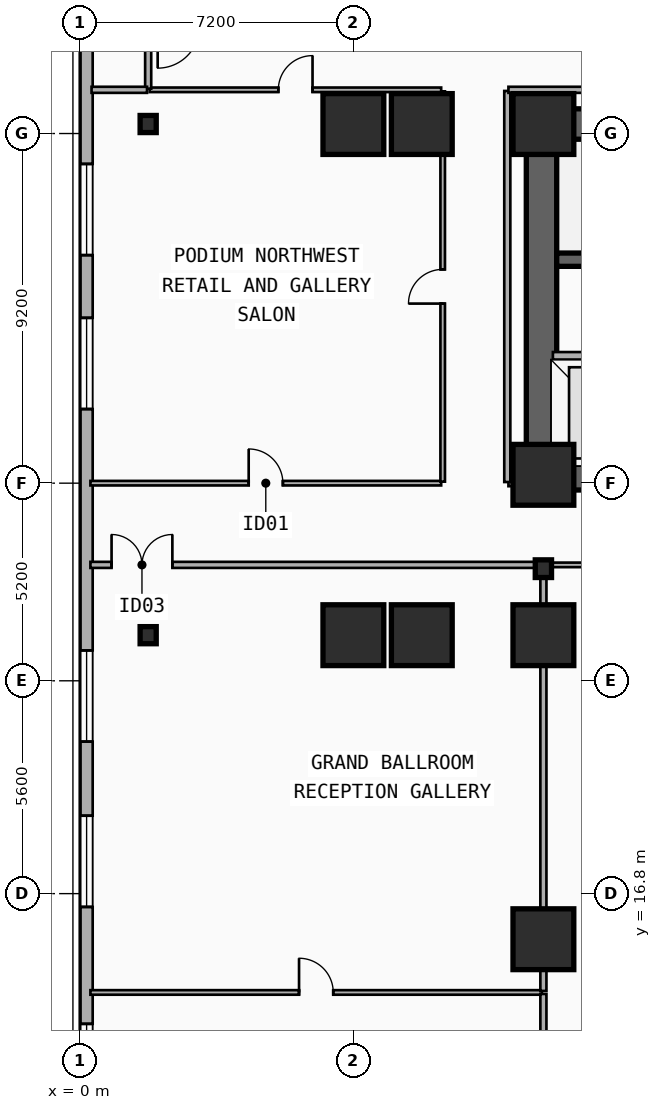
"""IFC4 building model, lengths in metres.
Left out: names, types, materials, properties, quantities, classifications, styles, units other than length and angle.
Written with IfcOpenShell. Run it as: python <this file> out.ifc"""

import sys

from ifc_helpers import new_model, si_unit, direction, frame, frame_2d, origin, origin_2d, place, context, subcontext, project, spatial, rectangle, i_section, extrude, element, fill, save


model = new_model("IFC4")
c1 = context("Model", 3, precision=1e-05, world=origin(), true_north=direction((0.0, 1.0)))
c2 = subcontext(c1, "Body", "Model", "MODEL_VIEW")
j1 = project(units=[si_unit("LENGTHUNIT", "METRE"), si_unit("PLANEANGLEUNIT", "RADIAN")], contexts=[c1])
p1 = place(None, origin())
s1 = spatial("IfcSite", under=j1, at=p1, CompositionType="ELEMENT")
p2 = place(p1, origin())
s2 = spatial("IfcBuilding", under=s1, at=p2, CompositionType="ELEMENT")
p3 = place(p2, frame((0.0, 0.0, 19.4)))
s3 = spatial("IfcBuildingStorey", under=s2, at=p3, CompositionType="ELEMENT", Elevation=19.4)
p4 = place(p3, frame((12.15, 37.05, 0.0), z_axis=(0.0, 0.0, 1.0), x_axis=(1.0, 0.0, 0.0)))
e1 = element("IfcWall", 1, at=p4, inside=s3, PredefinedType="SHEAR", context=c2, shape_type="SweptSolid", body=[
    extrude(rectangle(XDim=33.23, YDim=0.8, at=frame_2d((16.615, 0.0))), origin(), (0.0, 0.0, 1.0), 4.8),
])
p5 = place(p3, frame((21.18, 27.82, 0.0), z_axis=(0.0, 0.0, 1.0), x_axis=(-1.0, 0.0, 0.0)))
e2 = element("IfcWall", 2, at=p5, inside=s3, PredefinedType="SHEAR", context=c2, shape_type="SweptSolid", body=[
    extrude(rectangle(XDim=9.03, YDim=0.8, at=frame_2d((4.515, 0.0))), origin(), (0.0, 0.0, 1.0), 4.8),
])
p6 = place(p5, frame((2.68, 0.0, 0.0)))
e3 = element("IfcOpeningElement", 3, at=p6, cuts=e2, PredefinedType="OPENING", context=c2, shape_type="SweptSolid", body=[
    extrude(rectangle(XDim=1.1, YDim=2.15, at=frame_2d((0.55, 1.075))), frame((0.0, 0.41, 0.0), z_axis=(0.0, -1.0, 0.0), x_axis=(1.0, 0.0, 0.0)), (0.0, 0.0, 1.0), 0.82),
])
p7 = place(p3, frame((12.15, 28.22, 0.0), z_axis=(0.0, 0.0, 1.0), x_axis=(0.0, 1.0, 0.0)))
e4 = element("IfcWall", 4, at=p7, inside=s3, PredefinedType="SHEAR", context=c2, shape_type="SweptSolid", body=[
    extrude(rectangle(XDim=8.43, YDim=0.8, at=frame_2d((4.215, 0.0))), origin(), (0.0, 0.0, 1.0), 4.8),
])
p8 = place(p3, frame((21.005, 33.48, 0.0), z_axis=(0.0, 0.0, 1.0), x_axis=(-1.0, 0.0, 0.0)))
e5 = element("IfcWall", 5, at=p8, inside=s3, PredefinedType="SHEAR", context=c2, shape_type="SweptSolid", body=[
    extrude(rectangle(XDim=8.455, YDim=0.35, at=frame_2d((4.228, 0.0))), origin(), (0.0, 0.0, 1.0), 4.8),
])
p9 = place(p8, frame((0.22, 0.0, 0.0)))
e6 = element("IfcOpeningElement", 6, at=p9, cuts=e5, PredefinedType="OPENING", context=c2, shape_type="SweptSolid", body=[
    extrude(rectangle(XDim=1.1, YDim=2.15, at=frame_2d((0.55, 1.075))), frame((0.0, 0.185, 0.0), z_axis=(0.0, -1.0, 0.0), x_axis=(1.0, 0.0, 0.0)), (0.0, 0.0, 1.0), 0.37),
])
for number, where, z_axis, x_axis in (
    (7, (12.2, 27.82, 0.0), (0.0, 0.0, 1.0), (1.0, 0.0, 0.0)),
    (8, (12.2, 37.05, 0.0), (0.0, 0.0, 1.0), (1.0, 0.0, 0.0)),
):
    element("IfcColumn", number, at=place(p3, frame(where, z_axis=z_axis, x_axis=x_axis)), inside=s3, PredefinedType="COLUMN", context=c2, shape_type="SweptSolid", body=[
        extrude(rectangle(XDim=1.6, YDim=1.6, at=origin_2d()), origin(), (0.0, 0.0, 1.0), 4.8),
    ])
p10 = place(p3, frame((12.2, 25.35, 0.0), z_axis=(0.0, 0.0, 1.0), x_axis=(1.0, 0.0, 0.0)))
e9 = element("IfcColumn", 9, at=p10, inside=s3, PredefinedType="COLUMN", context=c2, shape_type="SweptSolid", body=[
    extrude(i_section(OverallWidth=0.428, OverallDepth=0.465, WebThickness=0.045, FlangeThickness=0.073, FilletRadius=0.015, at=origin_2d()), origin(), (0.0, 0.0, 1.0), 4.8),
])
for number, where, z_axis, x_axis in (
    (10, (1.8, 23.6, 0.0), (0.0, 0.0, 1.0), (1.0, 0.0, 0.0)),
    (11, (1.8, 37.05, 0.0), (0.0, 0.0, 1.0), (1.0, 0.0, 0.0)),
):
    element("IfcColumn", number, at=place(p3, frame(where, z_axis=z_axis, x_axis=x_axis)), inside=s3, PredefinedType="COLUMN", context=c2, shape_type="SweptSolid", body=[
        extrude(i_section(OverallWidth=0.424, OverallDepth=0.45, WebThickness=0.041, FlangeThickness=0.065, FilletRadius=0.015, at=origin_2d()), origin(), (0.0, 0.0, 1.0), 4.8),
    ])
for number, where, z_axis, x_axis in (
    (12, (7.2, 23.6, 0.0), (0.0, 0.0, 1.0), (1.0, 0.0, 0.0)),
    (13, (7.2, 37.05, 0.0), (0.0, 0.0, 1.0), (1.0, 0.0, 0.0)),
    (14, (9.0, 23.6, 0.0), (0.0, 0.0, 1.0), (1.0, 0.0, 0.0)),
    (15, (9.0, 37.05, 0.0), (0.0, 0.0, 1.0), (1.0, 0.0, 0.0)),
    (16, (12.2, 15.6, 0.0), (0.0, 0.0, 1.0), (1.0, 0.0, 0.0)),
    (17, (12.2, 23.6, 0.0), (0.0, 0.0, 1.0), (1.0, 0.0, 0.0)),
):
    element("IfcColumn", number, at=place(p3, frame(where, z_axis=z_axis, x_axis=x_axis)), inside=s3, PredefinedType="COLUMN", context=c2, shape_type="SweptSolid", body=[
        extrude(rectangle(XDim=1.6, YDim=1.6, at=origin_2d()), origin(), (0.0, 0.0, 1.0), 4.8),
    ])
p11 = place(p3, frame((0.18, 7.2, 0.0), z_axis=(0.0, 0.0, 1.0), x_axis=(0.0, 1.0, 0.0)))
e18 = element("IfcWall", 18, at=p11, inside=s3, PredefinedType="SOLIDWALL", context=c2, shape_type="SweptSolid", body=[
    extrude(rectangle(XDim=34.4, YDim=0.32, at=frame_2d((17.2, 0.0))), origin(), (0.0, 0.0, 1.0), 4.5),
])
p12 = place(p11, frame((22.35, 0.0, 0.9)))
e19 = element("IfcOpeningElement", 19, at=p12, cuts=e18, PredefinedType="OPENING", context=c2, shape_type="SweptSolid", body=[
    extrude(rectangle(XDim=2.4, YDim=1.8, at=frame_2d((1.2, 0.9))), frame((0.0, 0.17, 0.0), z_axis=(0.0, -1.0, 0.0), x_axis=(1.0, 0.0, 0.0)), (0.0, 0.0, 1.0), 0.34),
])
p13 = place(p11, frame((26.4, 0.0, 0.9)))
e20 = element("IfcOpeningElement", 20, at=p13, cuts=e18, PredefinedType="OPENING", context=c2, shape_type="SweptSolid", body=[
    extrude(rectangle(XDim=2.4, YDim=1.8, at=frame_2d((1.2, 0.9))), frame((0.0, 0.17, 0.0), z_axis=(0.0, -1.0, 0.0), x_axis=(1.0, 0.0, 0.0)), (0.0, 0.0, 1.0), 0.34),
])
p14 = place(p11, frame((0.847, 0.0, 0.9)))
e21 = element("IfcOpeningElement", 21, at=p14, cuts=e18, PredefinedType="OPENING", context=c2, shape_type="SweptSolid", body=[
    extrude(rectangle(XDim=2.4, YDim=1.8, at=frame_2d((1.2, 0.9))), frame((0.0, 0.17, 0.0), z_axis=(0.0, -1.0, 0.0), x_axis=(1.0, 0.0, 0.0)), (0.0, 0.0, 1.0), 0.34),
])
p15 = place(p11, frame((3.773, 0.0, 0.9)))
e22 = element("IfcOpeningElement", 22, at=p15, cuts=e18, PredefinedType="OPENING", context=c2, shape_type="SweptSolid", body=[
    extrude(rectangle(XDim=2.4, YDim=1.8, at=frame_2d((1.2, 0.9))), frame((0.0, 0.17, 0.0), z_axis=(0.0, -1.0, 0.0), x_axis=(1.0, 0.0, 0.0)), (0.0, 0.0, 1.0), 0.34),
])
p16 = place(p11, frame((9.25, 0.0, 0.9)))
e23 = element("IfcOpeningElement", 23, at=p16, cuts=e18, PredefinedType="OPENING", context=c2, shape_type="SweptSolid", body=[
    extrude(rectangle(XDim=2.4, YDim=1.8, at=frame_2d((1.2, 0.9))), frame((0.0, 0.17, 0.0), z_axis=(0.0, -1.0, 0.0), x_axis=(1.0, 0.0, 0.0)), (0.0, 0.0, 1.0), 0.34),
])
p17 = place(p11, frame((13.6, 0.0, 0.9)))
e24 = element("IfcOpeningElement", 24, at=p17, cuts=e18, PredefinedType="OPENING", context=c2, shape_type="SweptSolid", body=[
    extrude(rectangle(XDim=2.4, YDim=1.8, at=frame_2d((1.2, 0.9))), frame((0.0, 0.17, 0.0), z_axis=(0.0, -1.0, 0.0), x_axis=(1.0, 0.0, 0.0)), (0.0, 0.0, 1.0), 0.34),
])
p18 = place(p3, frame((12.45, 30.95, 0.0), z_axis=(0.0, 0.0, 1.0), x_axis=(1.0, 0.0, 0.0)))
e25 = element("IfcWall", 25, at=p18, inside=s3, PredefinedType="PARTITIONING", context=c2, shape_type="SweptSolid", body=[
    extrude(rectangle(XDim=2.75, YDim=0.2, at=frame_2d((1.375, 0.0))), origin(), (0.0, 0.0, 1.0), 3.472),
])
p19 = place(p3, frame((0.28, 27.6, 0.0), z_axis=(0.0, 0.0, 1.0), x_axis=(1.0, 0.0, 0.0)))
e26 = element("IfcWall", 26, at=p19, inside=s3, PredefinedType="PARTITIONING", context=c2, shape_type="SweptSolid", body=[
    extrude(rectangle(XDim=9.23, YDim=0.12, at=frame_2d((4.615, 0.0))), origin(), (0.0, 0.0, 1.0), 4.5),
])
p20 = place(p19, frame((4.165, 0.0, 0.0)))
e27 = element("IfcOpeningElement", 27, at=p20, cuts=e26, PredefinedType="OPENING", context=c2, shape_type="SweptSolid", body=[
    extrude(rectangle(XDim=0.9, YDim=2.1, at=frame_2d((0.45, 1.05))), frame((0.0, 0.07, 0.0), z_axis=(0.0, -1.0, 0.0), x_axis=(1.0, 0.0, 0.0)), (0.0, 0.0, 1.0), 0.14),
])
p21 = place(p3, frame((0.28, 25.45, 0.0), z_axis=(0.0, 0.0, 1.0), x_axis=(1.0, 0.0, 0.0)))
e28 = element("IfcWall", 28, at=p21, inside=s3, PredefinedType="PARTITIONING", context=c2, shape_type="SweptSolid", body=[
    extrude(rectangle(XDim=11.88, YDim=0.16, at=frame_2d((5.94, 0.0))), origin(), (0.0, 0.0, 1.0), 3.666),
])
p22 = place(p21, frame((0.557, 0.0, 0.0)))
e29 = element("IfcOpeningElement", 29, at=p22, cuts=e28, PredefinedType="OPENING", context=c2, shape_type="SweptSolid", body=[
    extrude(rectangle(XDim=1.6, YDim=2.2, at=frame_2d((0.8, 1.1))), frame((0.0, 0.09, 0.0), z_axis=(0.0, -1.0, 0.0), x_axis=(1.0, 0.0, 0.0)), (0.0, 0.0, 1.0), 0.18),
])
p23 = place(p3, frame((12.24, 25.45, 0.0), z_axis=(0.0, 0.0, 1.0), x_axis=(1.0, 0.0, 0.0)))
e30 = element("IfcWall", 30, at=p23, inside=s3, PredefinedType="PARTITIONING", context=c2, shape_type="SweptSolid", body=[
    extrude(rectangle(XDim=6.52, YDim=0.12, at=frame_2d((3.26, 0.0))), origin(), (0.0, 0.0, 1.0), 3.666),
])
p24 = place(p23, frame((2.81, 0.0, 0.0)))
e31 = element("IfcOpeningElement", 31, at=p24, cuts=e30, PredefinedType="OPENING", context=c2, shape_type="SweptSolid", body=[
    extrude(rectangle(XDim=0.9, YDim=2.1, at=frame_2d((0.45, 1.05))), frame((0.0, 0.07, 0.0), z_axis=(0.0, -1.0, 0.0), x_axis=(1.0, 0.0, 0.0)), (0.0, 0.0, 1.0), 0.14),
])
p25 = place(p3, frame((9.55, 27.64, 0.0), z_axis=(0.0, 0.0, 1.0), x_axis=(0.0, 1.0, 0.0)))
e32 = element("IfcWall", 32, at=p25, inside=s3, PredefinedType="PARTITIONING", context=c2, shape_type="SweptSolid", body=[
    extrude(rectangle(XDim=10.27, YDim=0.12, at=frame_2d((5.135, 0.0))), origin(), (0.0, 0.0, 1.0), 4.5),
])
p26 = place(p25, frame((4.685, 0.0, 0.0)))
e33 = element("IfcOpeningElement", 33, at=p26, cuts=e32, PredefinedType="OPENING", context=c2, shape_type="SweptSolid", body=[
    extrude(rectangle(XDim=0.9, YDim=2.1, at=frame_2d((0.45, 1.05))), frame((0.0, 0.07, 0.0), z_axis=(0.0, -1.0, 0.0), x_axis=(1.0, 0.0, 0.0)), (0.0, 0.0, 1.0), 0.14),
])
p27 = place(p3, frame((1.84, 37.95, 0.0), z_axis=(0.0, 0.0, 1.0), x_axis=(1.0, 0.0, 0.0)))
e34 = element("IfcWall", 34, at=p27, inside=s3, PredefinedType="PARTITIONING", context=c2, shape_type="SweptSolid", body=[
    extrude(rectangle(XDim=7.67, YDim=0.12, at=frame_2d((3.835, 0.0))), origin(), (0.0, 0.0, 1.0), 4.5),
])
p28 = place(p27, frame((3.385, 0.0, 0.0)))
e35 = element("IfcOpeningElement", 35, at=p28, cuts=e34, PredefinedType="OPENING", context=c2, shape_type="SweptSolid", body=[
    extrude(rectangle(XDim=0.9, YDim=2.1, at=frame_2d((0.45, 1.05))), frame((0.0, 0.07, 0.0), z_axis=(0.0, -1.0, 0.0), x_axis=(1.0, 0.0, 0.0)), (0.0, 0.0, 1.0), 0.14),
])
p29 = place(p3, frame((0.28, 14.2, 0.0), z_axis=(0.0, 0.0, 1.0), x_axis=(1.0, 0.0, 0.0)))
e36 = element("IfcWall", 36, at=p29, inside=s3, PredefinedType="PARTITIONING", context=c2, shape_type="SweptSolid", body=[
    extrude(rectangle(XDim=11.88, YDim=0.12, at=frame_2d((5.94, 0.0))), origin(), (0.0, 0.0, 1.0), 3.666),
])
p30 = place(p29, frame((5.49, 0.0, 0.0)))
e37 = element("IfcOpeningElement", 37, at=p30, cuts=e36, PredefinedType="OPENING", context=c2, shape_type="SweptSolid", body=[
    extrude(rectangle(XDim=0.9, YDim=2.1, at=frame_2d((0.45, 1.05))), frame((0.0, 0.07, 0.0), z_axis=(0.0, -1.0, 0.0), x_axis=(1.0, 0.0, 0.0)), (0.0, 0.0, 1.0), 0.14),
])
p31 = place(p3, frame((12.2, 3.88, 0.0), z_axis=(0.0, 0.0, 1.0), x_axis=(0.0, 1.0, 0.0)))
e38 = element("IfcWall", 38, at=p31, inside=s3, PredefinedType="PARTITIONING", context=c2, shape_type="SweptSolid", body=[
    extrude(rectangle(XDim=10.28, YDim=0.16, at=frame_2d((5.14, 0.0))), origin(), (0.0, 0.0, 1.0), 3.666),
])
p32 = place(p3, frame((12.2, 14.24, 0.0), z_axis=(0.0, 0.0, 1.0), x_axis=(0.0, 1.0, 0.0)))
e39 = element("IfcWall", 39, at=p32, inside=s3, PredefinedType="PARTITIONING", context=c2, shape_type="SweptSolid", body=[
    extrude(rectangle(XDim=11.17, YDim=0.16, at=frame_2d((5.585, 0.0))), origin(), (0.0, 0.0, 1.0), 3.472),
])
p33 = place(p3, frame((11.28, 27.6, 0.0), z_axis=(0.0, 0.0, 1.0), x_axis=(1.0, 0.0, 0.0)))
e40 = element("IfcWall", 40, at=p33, inside=s3, PredefinedType="PARTITIONING", context=c2, shape_type="SweptSolid", body=[
    extrude(rectangle(XDim=0.84, YDim=0.16, at=frame_2d((0.42, 0.0))), origin(), (0.0, 0.0, 1.0), 3.472),
])
p34 = place(p3, frame((11.25, 27.63, 0.0), z_axis=(0.0, 0.0, 1.0), x_axis=(0.0, 1.0, 0.0)))
e41 = element("IfcWall", 41, at=p34, inside=s3, PredefinedType="PARTITIONING", context=c2, shape_type="SweptSolid", body=[
    extrude(rectangle(XDim=10.29, YDim=0.16, at=frame_2d((5.145, 0.0))), origin(), (0.0, 0.0, 1.0), 4.5),
])
p35 = place(p3, frame((11.28, 37.95, 0.0), z_axis=(0.0, 0.0, 1.0), x_axis=(1.0, 0.0, 0.0)))
e42 = element("IfcWall", 42, at=p35, inside=s3, PredefinedType="PARTITIONING", context=c2, shape_type="SweptSolid", body=[
    extrude(rectangle(XDim=35.04, YDim=0.16, at=frame_2d((17.52, 0.0))), origin(), (0.0, 0.0, 1.0), 3.83),
])
p36 = place(p3, frame((1.8, 37.98, 0.0), z_axis=(0.0, 0.0, 1.0), x_axis=(0.0, 1.0, 0.0)))
e43 = element("IfcWall", 43, at=p36, inside=s3, PredefinedType="PARTITIONING", context=c2, shape_type="SweptSolid", body=[
    extrude(rectangle(XDim=1.785, YDim=0.16, at=frame_2d((0.893, 0.0))), origin(), (0.0, 0.0, 1.0), 4.5),
])
p37 = place(p3, frame((0.31, 37.95, 0.0), z_axis=(0.0, 0.0, 1.0), x_axis=(1.0, 0.0, 0.0)))
e44 = element("IfcWall", 44, at=p37, inside=s3, PredefinedType="PARTITIONING", context=c2, shape_type="SweptSolid", body=[
    extrude(rectangle(XDim=1.46, YDim=0.16, at=frame_2d((0.73, 0.0))), origin(), (0.0, 0.0, 1.0), 4.5),
])
p38 = place(p12, origin())
e45 = element("IfcWindow", 45, at=p38, inside=s3, PartitioningType="SINGLE_PANEL", PredefinedType="WINDOW", context=c2, shape_type="SweptSolid", body=[
    extrude(rectangle(XDim=2.4, YDim=1.8, at=frame_2d((1.2, 0.9))), frame((0.0, 0.03, 0.0), z_axis=(0.0, -1.0, 0.0), x_axis=(1.0, 0.0, 0.0)), (0.0, 0.0, 1.0), 0.06),
])
fill(e19, e45)
p39 = place(p13, origin())
e46 = element("IfcWindow", 46, at=p39, inside=s3, PartitioningType="SINGLE_PANEL", PredefinedType="WINDOW", context=c2, shape_type="SweptSolid", body=[
    extrude(rectangle(XDim=2.4, YDim=1.8, at=frame_2d((1.2, 0.9))), frame((0.0, 0.03, 0.0), z_axis=(0.0, -1.0, 0.0), x_axis=(1.0, 0.0, 0.0)), (0.0, 0.0, 1.0), 0.06),
])
fill(e20, e46)
p40 = place(p15, origin())
e47 = element("IfcWindow", 47, at=p40, inside=s3, PartitioningType="SINGLE_PANEL", PredefinedType="WINDOW", context=c2, shape_type="SweptSolid", body=[
    extrude(rectangle(XDim=2.4, YDim=1.8, at=frame_2d((1.2, 0.9))), frame((0.0, 0.03, 0.0), z_axis=(0.0, -1.0, 0.0), x_axis=(1.0, 0.0, 0.0)), (0.0, 0.0, 1.0), 0.06),
])
fill(e22, e47)
p41 = place(p16, origin())
e48 = element("IfcWindow", 48, at=p41, inside=s3, PartitioningType="SINGLE_PANEL", PredefinedType="WINDOW", context=c2, shape_type="SweptSolid", body=[
    extrude(rectangle(XDim=2.4, YDim=1.8, at=frame_2d((1.2, 0.9))), frame((0.0, 0.03, 0.0), z_axis=(0.0, -1.0, 0.0), x_axis=(1.0, 0.0, 0.0)), (0.0, 0.0, 1.0), 0.06),
])
fill(e23, e48)
p42 = place(p17, origin())
e49 = element("IfcWindow", 49, at=p42, inside=s3, PartitioningType="SINGLE_PANEL", PredefinedType="WINDOW", context=c2, shape_type="SweptSolid", body=[
    extrude(rectangle(XDim=2.4, YDim=1.8, at=frame_2d((1.2, 0.9))), frame((0.0, 0.03, 0.0), z_axis=(0.0, -1.0, 0.0), x_axis=(1.0, 0.0, 0.0)), (0.0, 0.0, 1.0), 0.06),
])
fill(e24, e49)
p43 = place(p20, origin())
e50 = element("IfcDoor", 50, at=p43, inside=s3, OperationType="SINGLE_SWING_LEFT", PredefinedType="DOOR", context=c2, shape_type="SweptSolid", body=[
    extrude(rectangle(XDim=0.9, YDim=2.1, at=frame_2d((0.45, 1.05))), frame((0.0, 0.025, 0.0), z_axis=(0.0, -1.0, 0.0), x_axis=(1.0, 0.0, 0.0)), (0.0, 0.0, 1.0), 0.05),
])
fill(e27, e50)
p44 = place(p22, origin())
e51 = element("IfcDoor", 51, at=p44, inside=s3, OperationType="SINGLE_SWING_LEFT", PredefinedType="DOOR", context=c2, shape_type="SweptSolid", body=[
    extrude(rectangle(XDim=1.6, YDim=2.2, at=frame_2d((0.8, 1.1))), frame((0.0, 0.025, 0.0), z_axis=(0.0, -1.0, 0.0), x_axis=(1.0, 0.0, 0.0)), (0.0, 0.0, 1.0), 0.05),
])
fill(e29, e51)
p45 = place(p26, origin())
e52 = element("IfcDoor", 52, at=p45, inside=s3, OperationType="SINGLE_SWING_LEFT", PredefinedType="DOOR", context=c2, shape_type="SweptSolid", body=[
    extrude(rectangle(XDim=0.9, YDim=2.1, at=frame_2d((0.45, 1.05))), frame((0.0, 0.025, 0.0), z_axis=(0.0, -1.0, 0.0), x_axis=(1.0, 0.0, 0.0)), (0.0, 0.0, 1.0), 0.05),
])
fill(e33, e52)
p46 = place(p28, origin())
e53 = element("IfcDoor", 53, at=p46, inside=s3, OperationType="SINGLE_SWING_RIGHT", PredefinedType="DOOR", context=c2, shape_type="SweptSolid", body=[
    extrude(rectangle(XDim=0.9, YDim=2.1, at=frame_2d((0.45, 1.05))), frame((0.0, 0.025, 0.0), z_axis=(0.0, -1.0, 0.0), x_axis=(1.0, 0.0, 0.0)), (0.0, 0.0, 1.0), 0.05),
])
fill(e35, e53)
p47 = place(p30, origin())
e54 = element("IfcDoor", 54, at=p47, inside=s3, OperationType="SINGLE_SWING_LEFT", PredefinedType="DOOR", context=c2, shape_type="SweptSolid", body=[
    extrude(rectangle(XDim=0.9, YDim=2.1, at=frame_2d((0.45, 1.05))), frame((0.0, 0.025, 0.0), z_axis=(0.0, -1.0, 0.0), x_axis=(1.0, 0.0, 0.0)), (0.0, 0.0, 1.0), 0.05),
])
fill(e37, e54)
save(model, sys.argv[1])
